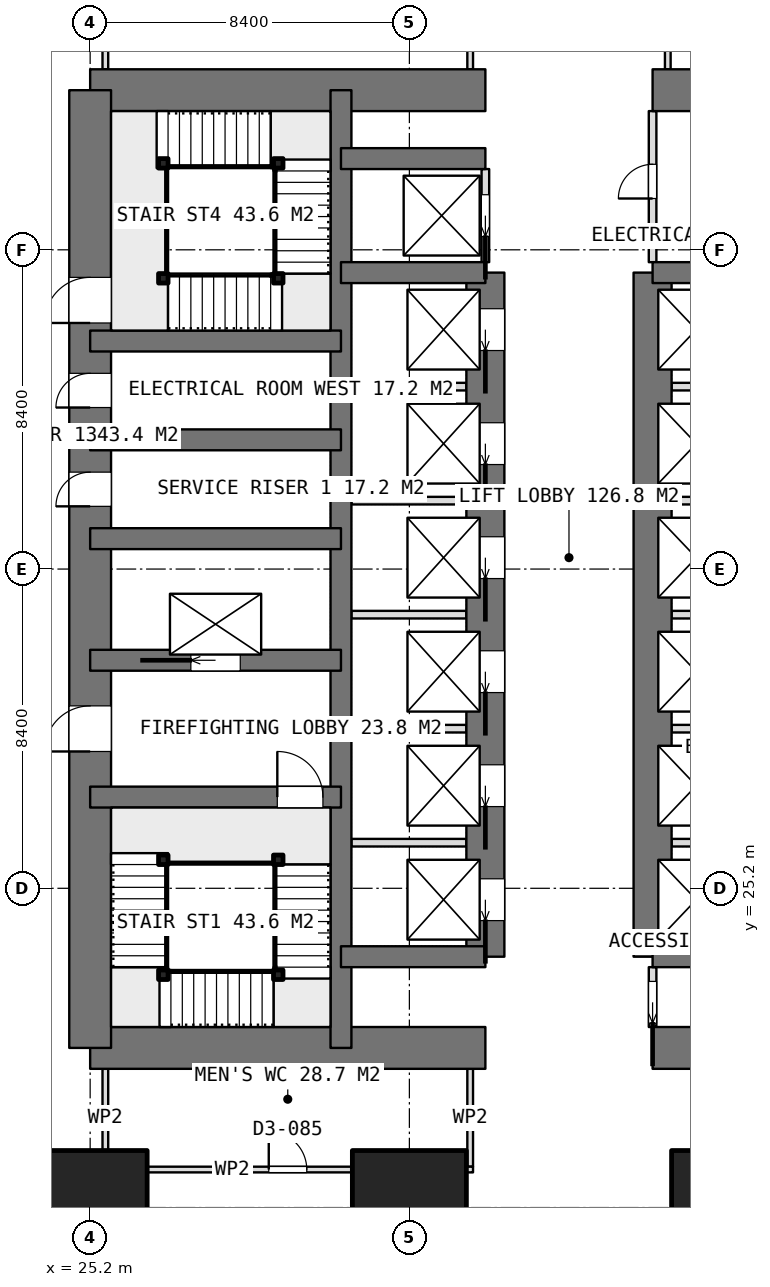
"""IFC4 building model, lengths in metres.
Left out: names, types, materials, properties, quantities, classifications, styles, units other than length and angle.
Written with IfcOpenShell. Run it as: python <this file> out.ifc"""

import sys

from ifc_helpers import new_model, si_unit, direction, frame, frame_2d, origin, origin_2d, place, context, subcontext, project, spatial, rectangle, extrude, element, fill, save


model = new_model("IFC4")
c1 = context("Model", 3, precision=1e-05, world=origin(), true_north=direction((0.0, 1.0)))
c2 = subcontext(c1, "Body", "Model", "MODEL_VIEW")
j1 = project(units=[si_unit("LENGTHUNIT", "METRE"), si_unit("PLANEANGLEUNIT", "RADIAN")], contexts=[c1])
p1 = place(None, origin())
s1 = spatial("IfcSite", under=j1, at=p1, CompositionType="ELEMENT")
p2 = place(p1, origin())
s2 = spatial("IfcBuilding", under=s1, at=p2, CompositionType="ELEMENT")
p3 = place(p2, frame((0.0, 0.0, 77.9)))
s3 = spatial("IfcBuildingStorey", under=s2, at=p3, CompositionType="ELEMENT", Elevation=77.9)
p4 = place(p3, frame((25.2, 21.0, 0.0), z_axis=(0.0, 0.0, 1.0), x_axis=(1.0, 0.0, 0.0)))
e1 = element("IfcWall", 1, at=p4, inside=s3, PredefinedType="SHEAR", context=c2, shape_type="SweptSolid", body=[
    extrude(rectangle(XDim=10.4, YDim=1.1, at=frame_2d((5.2, 0.0))), origin(), (0.0, 0.0, 1.0), 3.75),
])
p5 = place(p3, frame((40.0, 21.0, 0.0), z_axis=(0.0, 0.0, 1.0), x_axis=(1.0, 0.0, 0.0)))
e2 = element("IfcWall", 2, at=p5, inside=s3, PredefinedType="SHEAR", context=c2, shape_type="SweptSolid", body=[
    extrude(rectangle(XDim=10.4, YDim=1.1, at=frame_2d((5.2, 0.0))), origin(), (0.0, 0.0, 1.0), 3.75),
])
p6 = place(p3, frame((25.2, 46.2, 0.0), z_axis=(0.0, 0.0, 1.0), x_axis=(1.0, 0.0, 0.0)))
e3 = element("IfcWall", 3, at=p6, inside=s3, PredefinedType="SHEAR", context=c2, shape_type="SweptSolid", body=[
    extrude(rectangle(XDim=10.4, YDim=1.1, at=frame_2d((5.2, 0.0))), origin(), (0.0, 0.0, 1.0), 3.75),
])
p7 = place(p3, frame((40.0, 46.2, 0.0), z_axis=(0.0, 0.0, 1.0), x_axis=(1.0, 0.0, 0.0)))
e4 = element("IfcWall", 4, at=p7, inside=s3, PredefinedType="SHEAR", context=c2, shape_type="SweptSolid", body=[
    extrude(rectangle(XDim=10.4, YDim=1.1, at=frame_2d((5.2, 0.0))), origin(), (0.0, 0.0, 1.0), 3.75),
])
p8 = place(p3, frame((25.2, 21.0, 0.0), z_axis=(0.0, 0.0, 1.0), x_axis=(0.0, 1.0, 0.0)))
e5 = element("IfcWall", 5, at=p8, inside=s3, PredefinedType="SHEAR", context=c2, shape_type="SweptSolid", body=[
    extrude(rectangle(XDim=25.2, YDim=1.1, at=frame_2d((12.6, 0.0))), origin(), (0.0, 0.0, 1.0), 3.75),
])
p9 = place(p8, frame((7.8, 0.0, 0.0)))
e6 = element("IfcOpeningElement", 6, at=p9, cuts=e5, PredefinedType="OPENING", context=c2, shape_type="SweptSolid", body=[
    extrude(rectangle(XDim=1.2, YDim=2.1, at=frame_2d((0.6, 1.05))), frame((0.0, 0.56, 0.0), z_axis=(0.0, -1.0, 0.0), x_axis=(1.0, 0.0, 0.0)), (0.0, 0.0, 1.0), 1.12),
])
p10 = place(p8, frame((14.25, 0.0, 0.0)))
e7 = element("IfcOpeningElement", 7, at=p10, cuts=e5, PredefinedType="OPENING", context=c2, shape_type="SweptSolid", body=[
    extrude(rectangle(XDim=0.9, YDim=2.1, at=frame_2d((0.45, 1.05))), frame((0.0, 0.56, 0.0), z_axis=(0.0, -1.0, 0.0), x_axis=(1.0, 0.0, 0.0)), (0.0, 0.0, 1.0), 1.12),
])
p11 = place(p8, frame((16.85, 0.0, 0.0)))
e8 = element("IfcOpeningElement", 8, at=p11, cuts=e5, PredefinedType="OPENING", context=c2, shape_type="SweptSolid", body=[
    extrude(rectangle(XDim=0.9, YDim=2.1, at=frame_2d((0.45, 1.05))), frame((0.0, 0.56, 0.0), z_axis=(0.0, -1.0, 0.0), x_axis=(1.0, 0.0, 0.0)), (0.0, 0.0, 1.0), 1.12),
])
p12 = place(p8, frame((19.075, 0.0, 0.0)))
e9 = element("IfcOpeningElement", 9, at=p12, cuts=e5, PredefinedType="OPENING", context=c2, shape_type="SweptSolid", body=[
    extrude(rectangle(XDim=1.2, YDim=2.1, at=frame_2d((0.6, 1.05))), frame((0.0, 0.56, 0.0), z_axis=(0.0, -1.0, 0.0), x_axis=(1.0, 0.0, 0.0)), (0.0, 0.0, 1.0), 1.12),
])
p13 = place(p3, frame((31.8, 21.0, 0.0), z_axis=(0.0, 0.0, 1.0), x_axis=(0.0, 1.0, 0.0)))
e10 = element("IfcWall", 10, at=p13, inside=s3, PredefinedType="SHEAR", context=c2, shape_type="SweptSolid", body=[
    extrude(rectangle(XDim=25.2, YDim=0.55, at=frame_2d((12.6, 0.0))), origin(), (0.0, 0.0, 1.0), 3.75),
])
p14 = place(p3, frame((35.6, 23.4, 0.0), z_axis=(0.0, 0.0, 1.0), x_axis=(0.0, 1.0, 0.0)))
e11 = element("IfcWall", 11, at=p14, inside=s3, PredefinedType="SHEAR", context=c2, shape_type="SweptSolid", body=[
    extrude(rectangle(XDim=18.0, YDim=1.0, at=frame_2d((9.0, 0.0))), origin(), (0.0, 0.0, 1.0), 3.75),
])
p15 = place(p14, frame((0.95, 0.0, 0.0)))
e12 = element("IfcOpeningElement", 12, at=p15, cuts=e11, PredefinedType="OPENING", context=c2, shape_type="SweptSolid", body=[
    extrude(rectangle(XDim=1.1, YDim=2.1, at=frame_2d((0.55, 1.05))), frame((0.0, 0.51, 0.0), z_axis=(0.0, -1.0, 0.0), x_axis=(1.0, 0.0, 0.0)), (0.0, 0.0, 1.0), 1.02),
])
p16 = place(p14, frame((3.95, 0.0, 0.0)))
e13 = element("IfcOpeningElement", 13, at=p16, cuts=e11, PredefinedType="OPENING", context=c2, shape_type="SweptSolid", body=[
    extrude(rectangle(XDim=1.1, YDim=2.1, at=frame_2d((0.55, 1.05))), frame((0.0, 0.51, 0.0), z_axis=(0.0, -1.0, 0.0), x_axis=(1.0, 0.0, 0.0)), (0.0, 0.0, 1.0), 1.02),
])
p17 = place(p14, frame((6.95, 0.0, 0.0)))
e14 = element("IfcOpeningElement", 14, at=p17, cuts=e11, PredefinedType="OPENING", context=c2, shape_type="SweptSolid", body=[
    extrude(rectangle(XDim=1.1, YDim=2.1, at=frame_2d((0.55, 1.05))), frame((0.0, 0.51, 0.0), z_axis=(0.0, -1.0, 0.0), x_axis=(1.0, 0.0, 0.0)), (0.0, 0.0, 1.0), 1.02),
])
p18 = place(p14, frame((9.95, 0.0, 0.0)))
e15 = element("IfcOpeningElement", 15, at=p18, cuts=e11, PredefinedType="OPENING", context=c2, shape_type="SweptSolid", body=[
    extrude(rectangle(XDim=1.1, YDim=2.1, at=frame_2d((0.55, 1.05))), frame((0.0, 0.51, 0.0), z_axis=(0.0, -1.0, 0.0), x_axis=(1.0, 0.0, 0.0)), (0.0, 0.0, 1.0), 1.02),
])
p19 = place(p14, frame((12.95, 0.0, 0.0)))
e16 = element("IfcOpeningElement", 16, at=p19, cuts=e11, PredefinedType="OPENING", context=c2, shape_type="SweptSolid", body=[
    extrude(rectangle(XDim=1.1, YDim=2.1, at=frame_2d((0.55, 1.05))), frame((0.0, 0.51, 0.0), z_axis=(0.0, -1.0, 0.0), x_axis=(1.0, 0.0, 0.0)), (0.0, 0.0, 1.0), 1.02),
])
p20 = place(p14, frame((15.95, 0.0, 0.0)))
e17 = element("IfcOpeningElement", 17, at=p20, cuts=e11, PredefinedType="OPENING", context=c2, shape_type="SweptSolid", body=[
    extrude(rectangle(XDim=1.1, YDim=2.1, at=frame_2d((0.55, 1.05))), frame((0.0, 0.51, 0.0), z_axis=(0.0, -1.0, 0.0), x_axis=(1.0, 0.0, 0.0)), (0.0, 0.0, 1.0), 1.02),
])
p21 = place(p3, frame((40.0, 23.4, 0.0), z_axis=(0.0, 0.0, 1.0), x_axis=(0.0, 1.0, 0.0)))
e18 = element("IfcWall", 18, at=p21, inside=s3, PredefinedType="SHEAR", context=c2, shape_type="SweptSolid", body=[
    extrude(rectangle(XDim=18.0, YDim=1.0, at=frame_2d((9.0, 0.0))), origin(), (0.0, 0.0, 1.0), 3.75),
])
for number, where, z_axis, x_axis in (
    (19, (31.8, 23.4, 0.0), (0.0, 0.0, 1.0), (1.0, 0.0, 0.0)),
    (20, (31.8, 41.4, 0.0), (0.0, 0.0, 1.0), (1.0, 0.0, 0.0)),
    (21, (31.8, 44.4, 0.0), (0.0, 0.0, 1.0), (1.0, 0.0, 0.0)),
    (22, (40.0, 23.4, 0.0), (0.0, 0.0, 1.0), (1.0, 0.0, 0.0)),
    (23, (40.0, 41.4, 0.0), (0.0, 0.0, 1.0), (1.0, 0.0, 0.0)),
):
    element("IfcWall", number, at=place(p3, frame(where, z_axis=z_axis, x_axis=x_axis)), inside=s3, PredefinedType="SHEAR", context=c2, shape_type="SweptSolid", body=[
        extrude(rectangle(XDim=3.8, YDim=0.55, at=frame_2d((1.9, 0.0))), origin(), (0.0, 0.0, 1.0), 3.75),
    ])
p22 = place(p3, frame((25.2, 27.6, 0.0), z_axis=(0.0, 0.0, 1.0), x_axis=(1.0, 0.0, 0.0)))
e24 = element("IfcWall", 24, at=p22, inside=s3, PredefinedType="SHEAR", context=c2, shape_type="SweptSolid", body=[
    extrude(rectangle(XDim=6.6, YDim=0.55, at=frame_2d((3.3, 0.0))), origin(), (0.0, 0.0, 1.0), 3.75),
])
p23 = place(p22, frame((4.925, 0.0, 0.0)))
e25 = element("IfcOpeningElement", 25, at=p23, cuts=e24, PredefinedType="OPENING", context=c2, shape_type="SweptSolid", body=[
    extrude(rectangle(XDim=1.2, YDim=2.1, at=frame_2d((0.6, 1.05))), frame((0.0, 0.285, 0.0), z_axis=(0.0, -1.0, 0.0), x_axis=(1.0, 0.0, 0.0)), (0.0, 0.0, 1.0), 0.57),
])
p24 = place(p3, frame((25.2, 31.2, 0.0), z_axis=(0.0, 0.0, 1.0), x_axis=(1.0, 0.0, 0.0)))
e26 = element("IfcWall", 26, at=p24, inside=s3, PredefinedType="SHEAR", context=c2, shape_type="SweptSolid", body=[
    extrude(rectangle(XDim=6.6, YDim=0.55, at=frame_2d((3.3, 0.0))), origin(), (0.0, 0.0, 1.0), 3.75),
])
p25 = place(p24, frame((2.65, 0.0, 0.0)))
e27 = element("IfcOpeningElement", 27, at=p25, cuts=e26, PredefinedType="OPENING", context=c2, shape_type="SweptSolid", body=[
    extrude(rectangle(XDim=1.3, YDim=2.1, at=frame_2d((0.65, 1.05))), frame((0.0, 0.285, 0.0), z_axis=(0.0, -1.0, 0.0), x_axis=(1.0, 0.0, 0.0)), (0.0, 0.0, 1.0), 0.57),
])
for number, where, z_axis, x_axis in (
    (28, (25.2, 34.4, 0.0), (0.0, 0.0, 1.0), (1.0, 0.0, 0.0)),
    (29, (25.2, 37.0, 0.0), (0.0, 0.0, 1.0), (1.0, 0.0, 0.0)),
    (30, (25.2, 39.6, 0.0), (0.0, 0.0, 1.0), (1.0, 0.0, 0.0)),
):
    element("IfcWall", number, at=place(p3, frame(where, z_axis=z_axis, x_axis=x_axis)), inside=s3, PredefinedType="SHEAR", context=c2, shape_type="SweptSolid", body=[
        extrude(rectangle(XDim=6.6, YDim=0.55, at=frame_2d((3.3, 0.0))), origin(), (0.0, 0.0, 1.0), 3.75),
    ])
for number, where, z_axis, x_axis in (
    (31, (25.2, 16.8, 0.0), (0.0, 0.0, 1.0), (1.0, 0.0, 0.0)),
    (32, (33.6, 16.8, 0.0), (0.0, 0.0, 1.0), (1.0, 0.0, 0.0)),
    (33, (42.0, 16.8, 0.0), (0.0, 0.0, 1.0), (1.0, 0.0, 0.0)),
):
    element("IfcColumn", number, at=place(p3, frame(where, z_axis=z_axis, x_axis=x_axis)), inside=s3, PredefinedType="COLUMN", context=c2, shape_type="SweptSolid", body=[
        extrude(rectangle(XDim=3.0, YDim=3.0, at=origin_2d()), origin(), (0.0, 0.0, 1.0), 3.75),
    ])
for number, where, z_axis, x_axis in (
    (34, (32.075, 26.4, 0.0), (0.0, 0.0, 1.0), (1.0, 0.0, 0.0)),
    (35, (32.075, 29.4, 0.0), (0.0, 0.0, 1.0), (1.0, 0.0, 0.0)),
    (36, (32.075, 32.4, 0.0), (0.0, 0.0, 1.0), (1.0, 0.0, 0.0)),
    (37, (32.075, 35.4, 0.0), (0.0, 0.0, 1.0), (1.0, 0.0, 0.0)),
    (38, (32.075, 38.4, 0.0), (0.0, 0.0, 1.0), (1.0, 0.0, 0.0)),
):
    element("IfcWall", number, at=place(p3, frame(where, z_axis=z_axis, x_axis=x_axis)), inside=s3, PredefinedType="PARTITIONING", context=c2, shape_type="SweptSolid", body=[
        extrude(rectangle(XDim=3.025, YDim=0.2, at=frame_2d((1.513, 0.0))), origin(), (0.0, 0.0, 1.0), 3.5),
    ])
for number, where, z_axis, x_axis in (
    (39, (40.5, 26.4, 0.0), (0.0, 0.0, 1.0), (1.0, 0.0, 0.0)),
    (40, (40.5, 29.4, 0.0), (0.0, 0.0, 1.0), (1.0, 0.0, 0.0)),
    (41, (40.5, 32.4, 0.0), (0.0, 0.0, 1.0), (1.0, 0.0, 0.0)),
    (42, (40.5, 35.4, 0.0), (0.0, 0.0, 1.0), (1.0, 0.0, 0.0)),
    (43, (40.5, 38.4, 0.0), (0.0, 0.0, 1.0), (1.0, 0.0, 0.0)),
):
    element("IfcWall", number, at=place(p3, frame(where, z_axis=z_axis, x_axis=x_axis)), inside=s3, PredefinedType="PARTITIONING", context=c2, shape_type="SweptSolid", body=[
        extrude(rectangle(XDim=3.025, YDim=0.2, at=frame_2d((1.512, 0.0))), origin(), (0.0, 0.0, 1.0), 3.5),
    ])
p26 = place(p3, frame((40.0, 21.55, 0.0), z_axis=(0.0, 0.0, 1.0), x_axis=(0.0, 1.0, 0.0)))
e44 = element("IfcWall", 44, at=p26, inside=s3, PredefinedType="PARTITIONING", context=c2, shape_type="SweptSolid", body=[
    extrude(rectangle(XDim=1.575, YDim=0.2, at=frame_2d((0.788, 0.0))), origin(), (0.0, 0.0, 1.0), 3.5),
])
p27 = place(p26, frame((0.1, 0.0, 0.0)))
e45 = element("IfcOpeningElement", 45, at=p27, cuts=e44, PredefinedType="OPENING", context=c2, shape_type="SweptSolid", body=[
    extrude(rectangle(XDim=1.1, YDim=2.1, at=frame_2d((0.55, 1.05))), frame((0.0, 0.11, 0.0), z_axis=(0.0, -1.0, 0.0), x_axis=(1.0, 0.0, 0.0)), (0.0, 0.0, 1.0), 0.22),
])
p28 = place(p3, frame((40.0, 41.675, 0.0), z_axis=(0.0, 0.0, 1.0), x_axis=(0.0, 1.0, 0.0)))
e46 = element("IfcWall", 46, at=p28, inside=s3, PredefinedType="PARTITIONING", context=c2, shape_type="SweptSolid", body=[
    extrude(rectangle(XDim=3.975, YDim=0.2, at=frame_2d((1.987, 0.0))), origin(), (0.0, 0.0, 1.0), 3.5),
])
p29 = place(p28, frame((1.675, 0.0, 0.0)))
e47 = element("IfcOpeningElement", 47, at=p29, cuts=e46, PredefinedType="OPENING", context=c2, shape_type="SweptSolid", body=[
    extrude(rectangle(XDim=0.9, YDim=2.1, at=frame_2d((0.45, 1.05))), frame((0.0, 0.11, 0.0), z_axis=(0.0, -1.0, 0.0), x_axis=(1.0, 0.0, 0.0)), (0.0, 0.0, 1.0), 0.22),
])
p30 = place(p3, frame((35.6, 41.675, 0.0), z_axis=(0.0, 0.0, 1.0), x_axis=(0.0, 1.0, 0.0)))
e48 = element("IfcWall", 48, at=p30, inside=s3, PredefinedType="PARTITIONING", context=c2, shape_type="SweptSolid", body=[
    extrude(rectangle(XDim=2.45, YDim=0.2, at=frame_2d((1.225, 0.0))), origin(), (0.0, 0.0, 1.0), 3.5),
])
p31 = place(p30, frame((0.675, 0.0, 0.0)))
e49 = element("IfcOpeningElement", 49, at=p31, cuts=e48, PredefinedType="OPENING", context=c2, shape_type="SweptSolid", body=[
    extrude(rectangle(XDim=1.1, YDim=2.1, at=frame_2d((0.55, 1.05))), frame((0.0, 0.11, 0.0), z_axis=(0.0, -1.0, 0.0), x_axis=(1.0, 0.0, 0.0)), (0.0, 0.0, 1.0), 0.22),
])
for number, where, z_axis, x_axis in (
    (50, (40.4, 46.75, 0.0), (0.0, 0.0, 1.0), (0.0, 1.0, 0.0)),
    (51, (25.6, 46.75, 0.0), (0.0, 0.0, 1.0), (0.0, 1.0, 0.0)),
    (52, (35.2, 46.75, 0.0), (0.0, 0.0, 1.0), (0.0, 1.0, 0.0)),
):
    element("IfcWall", number, at=place(p3, frame(where, z_axis=z_axis, x_axis=x_axis)), inside=s3, PredefinedType="PARTITIONING", context=c2, shape_type="SweptSolid", body=[
        extrude(rectangle(XDim=2.575, YDim=0.15, at=frame_2d((1.288, 0.0))), origin(), (0.0, 0.0, 1.0), 3.5),
    ])
p32 = place(p3, frame((25.525, 17.8, 0.0), z_axis=(0.0, 0.0, 1.0), x_axis=(1.0, 0.0, 0.0)))
e53 = element("IfcWall", 53, at=p32, inside=s3, PredefinedType="PARTITIONING", context=c2, shape_type="SweptSolid", body=[
    extrude(rectangle(XDim=9.75, YDim=0.15, at=frame_2d((4.875, 0.0))), origin(), (0.0, 0.0, 1.0), 3.5),
])
p33 = place(p32, frame((4.375, 0.0, 0.0)))
e54 = element("IfcOpeningElement", 54, at=p33, cuts=e53, PredefinedType="OPENING", context=c2, shape_type="SweptSolid", body=[
    extrude(rectangle(XDim=1.0, YDim=2.1, at=frame_2d((0.5, 1.05))), frame((0.0, 0.085, 0.0), z_axis=(0.0, -1.0, 0.0), x_axis=(1.0, 0.0, 0.0)), (0.0, 0.0, 1.0), 0.17),
])
for number, where, z_axis, x_axis in (
    (55, (25.6, 17.875, 0.0), (0.0, 0.0, 1.0), (0.0, 1.0, 0.0)),
    (56, (35.2, 17.875, 0.0), (0.0, 0.0, 1.0), (0.0, 1.0, 0.0)),
):
    element("IfcWall", number, at=place(p3, frame(where, z_axis=z_axis, x_axis=x_axis)), inside=s3, PredefinedType="PARTITIONING", context=c2, shape_type="SweptSolid", body=[
        extrude(rectangle(XDim=2.575, YDim=0.15, at=frame_2d((1.288, 0.0))), origin(), (0.0, 0.0, 1.0), 3.5),
    ])
for number, where, z_axis, x_axis in (
    (57, (30.15, 25.95, 0.0), (0.0, 0.0, 1.0), (1.0, 0.0, 0.0)),
    (58, (30.15, 22.925, 0.0), (0.0, 0.0, 1.0), (1.0, 0.0, 0.0)),
    (59, (27.125, 22.925, 0.0), (0.0, 0.0, 1.0), (1.0, 0.0, 0.0)),
    (60, (27.125, 25.95, 0.0), (0.0, 0.0, 1.0), (1.0, 0.0, 0.0)),
    (61, (27.125, 41.25, 0.0), (0.0, 0.0, 1.0), (1.0, 0.0, 0.0)),
    (62, (30.15, 41.25, 0.0), (0.0, 0.0, 1.0), (1.0, 0.0, 0.0)),
    (63, (30.15, 44.275, 0.0), (0.0, 0.0, 1.0), (1.0, 0.0, 0.0)),
    (64, (27.125, 44.275, 0.0), (0.0, 0.0, 1.0), (1.0, 0.0, 0.0)),
):
    element("IfcColumn", number, at=place(p3, frame(where, z_axis=z_axis, x_axis=x_axis)), inside=s3, PredefinedType="COLUMN", context=c2, shape_type="SweptSolid", body=[
        extrude(rectangle(XDim=0.25, YDim=0.25, at=origin_2d()), origin(), (0.0, 0.0, 1.0), 3.75),
    ])
p34 = place(p9, origin())
e65 = element("IfcDoor", 65, at=p34, inside=s3, OperationType="SINGLE_SWING_LEFT", PredefinedType="DOOR", context=c2, shape_type="SweptSolid", body=[
    extrude(rectangle(XDim=1.2, YDim=2.1, at=frame_2d((0.6, 1.05))), frame((0.0, 0.025, 0.0), z_axis=(0.0, -1.0, 0.0), x_axis=(1.0, 0.0, 0.0)), (0.0, 0.0, 1.0), 0.05),
])
fill(e6, e65)
p35 = place(p10, origin())
e66 = element("IfcDoor", 66, at=p35, inside=s3, OperationType="SINGLE_SWING_LEFT", PredefinedType="DOOR", context=c2, shape_type="SweptSolid", body=[
    extrude(rectangle(XDim=0.9, YDim=2.1, at=frame_2d((0.45, 1.05))), frame((0.0, 0.025, 0.0), z_axis=(0.0, -1.0, 0.0), x_axis=(1.0, 0.0, 0.0)), (0.0, 0.0, 1.0), 0.05),
])
fill(e7, e66)
p36 = place(p11, origin())
e67 = element("IfcDoor", 67, at=p36, inside=s3, OperationType="SINGLE_SWING_LEFT", PredefinedType="DOOR", context=c2, shape_type="SweptSolid", body=[
    extrude(rectangle(XDim=0.9, YDim=2.1, at=frame_2d((0.45, 1.05))), frame((0.0, 0.025, 0.0), z_axis=(0.0, -1.0, 0.0), x_axis=(1.0, 0.0, 0.0)), (0.0, 0.0, 1.0), 0.05),
])
fill(e8, e67)
p37 = place(p27, origin())
e68 = element("IfcDoor", 68, at=p37, inside=s3, OperationType="SLIDING_TO_LEFT", PredefinedType="DOOR", context=c2, shape_type="SweptSolid", body=[
    extrude(rectangle(XDim=1.1, YDim=2.1, at=frame_2d((0.55, 1.05))), frame((0.0, 0.025, 0.0), z_axis=(0.0, -1.0, 0.0), x_axis=(1.0, 0.0, 0.0)), (0.0, 0.0, 1.0), 0.05),
])
fill(e45, e68)
p38 = place(p29, origin())
e69 = element("IfcDoor", 69, at=p38, inside=s3, OperationType="SINGLE_SWING_LEFT", PredefinedType="DOOR", context=c2, shape_type="SweptSolid", body=[
    extrude(rectangle(XDim=0.9, YDim=2.1, at=frame_2d((0.45, 1.05))), frame((0.0, 0.025, 0.0), z_axis=(0.0, -1.0, 0.0), x_axis=(1.0, 0.0, 0.0)), (0.0, 0.0, 1.0), 0.05),
])
fill(e47, e69)
p39 = place(p15, origin())
e70 = element("IfcDoor", 70, at=p39, inside=s3, OperationType="SLIDING_TO_LEFT", PredefinedType="USERDEFINED", context=c2, shape_type="SweptSolid", body=[
    extrude(rectangle(XDim=1.1, YDim=2.1, at=frame_2d((0.55, 1.05))), frame((0.0, 0.025, 0.0), z_axis=(0.0, -1.0, 0.0), x_axis=(1.0, 0.0, 0.0)), (0.0, 0.0, 1.0), 0.05),
])
fill(e12, e70)
p40 = place(p16, origin())
e71 = element("IfcDoor", 71, at=p40, inside=s3, OperationType="SLIDING_TO_LEFT", PredefinedType="USERDEFINED", context=c2, shape_type="SweptSolid", body=[
    extrude(rectangle(XDim=1.1, YDim=2.1, at=frame_2d((0.55, 1.05))), frame((0.0, 0.025, 0.0), z_axis=(0.0, -1.0, 0.0), x_axis=(1.0, 0.0, 0.0)), (0.0, 0.0, 1.0), 0.05),
])
fill(e13, e71)
p41 = place(p17, origin())
e72 = element("IfcDoor", 72, at=p41, inside=s3, OperationType="SLIDING_TO_LEFT", PredefinedType="USERDEFINED", context=c2, shape_type="SweptSolid", body=[
    extrude(rectangle(XDim=1.1, YDim=2.1, at=frame_2d((0.55, 1.05))), frame((0.0, 0.025, 0.0), z_axis=(0.0, -1.0, 0.0), x_axis=(1.0, 0.0, 0.0)), (0.0, 0.0, 1.0), 0.05),
])
fill(e14, e72)
p42 = place(p18, origin())
e73 = element("IfcDoor", 73, at=p42, inside=s3, OperationType="SLIDING_TO_LEFT", PredefinedType="USERDEFINED", context=c2, shape_type="SweptSolid", body=[
    extrude(rectangle(XDim=1.1, YDim=2.1, at=frame_2d((0.55, 1.05))), frame((0.0, 0.025, 0.0), z_axis=(0.0, -1.0, 0.0), x_axis=(1.0, 0.0, 0.0)), (0.0, 0.0, 1.0), 0.05),
])
fill(e15, e73)
p43 = place(p19, origin())
e74 = element("IfcDoor", 74, at=p43, inside=s3, OperationType="SLIDING_TO_LEFT", PredefinedType="USERDEFINED", context=c2, shape_type="SweptSolid", body=[
    extrude(rectangle(XDim=1.1, YDim=2.1, at=frame_2d((0.55, 1.05))), frame((0.0, 0.025, 0.0), z_axis=(0.0, -1.0, 0.0), x_axis=(1.0, 0.0, 0.0)), (0.0, 0.0, 1.0), 0.05),
])
fill(e16, e74)
p44 = place(p20, origin())
e75 = element("IfcDoor", 75, at=p44, inside=s3, OperationType="SLIDING_TO_LEFT", PredefinedType="USERDEFINED", context=c2, shape_type="SweptSolid", body=[
    extrude(rectangle(XDim=1.1, YDim=2.1, at=frame_2d((0.55, 1.05))), frame((0.0, 0.025, 0.0), z_axis=(0.0, -1.0, 0.0), x_axis=(1.0, 0.0, 0.0)), (0.0, 0.0, 1.0), 0.05),
])
fill(e17, e75)
p45 = place(p25, origin())
e76 = element("IfcDoor", 76, at=p45, inside=s3, OperationType="SLIDING_TO_LEFT", PredefinedType="USERDEFINED", context=c2, shape_type="SweptSolid", body=[
    extrude(rectangle(XDim=1.3, YDim=2.1, at=frame_2d((0.65, 1.05))), frame((0.0, 0.025, 0.0), z_axis=(0.0, -1.0, 0.0), x_axis=(1.0, 0.0, 0.0)), (0.0, 0.0, 1.0), 0.05),
])
fill(e27, e76)
p46 = place(p31, origin())
e77 = element("IfcDoor", 77, at=p46, inside=s3, OperationType="SLIDING_TO_LEFT", PredefinedType="USERDEFINED", context=c2, shape_type="SweptSolid", body=[
    extrude(rectangle(XDim=1.1, YDim=2.1, at=frame_2d((0.55, 1.05))), frame((0.0, 0.025, 0.0), z_axis=(0.0, -1.0, 0.0), x_axis=(1.0, 0.0, 0.0)), (0.0, 0.0, 1.0), 0.05),
])
fill(e49, e77)
p47 = place(p33, origin())
e78 = element("IfcDoor", 78, at=p47, inside=s3, OperationType="SINGLE_SWING_LEFT", PredefinedType="DOOR", context=c2, shape_type="SweptSolid", body=[
    extrude(rectangle(XDim=1.0, YDim=2.1, at=frame_2d((0.5, 1.05))), frame((0.0, 0.025, 0.0), z_axis=(0.0, -1.0, 0.0), x_axis=(1.0, 0.0, 0.0)), (0.0, 0.0, 1.0), 0.05),
])
fill(e54, e78)
p48 = place(p23, origin())
e79 = element("IfcDoor", 79, at=p48, inside=s3, OperationType="SINGLE_SWING_RIGHT", PredefinedType="DOOR", context=c2, shape_type="SweptSolid", body=[
    extrude(rectangle(XDim=1.2, YDim=2.1, at=frame_2d((0.6, 1.05))), frame((0.0, 0.025, 0.0), z_axis=(0.0, -1.0, 0.0), x_axis=(1.0, 0.0, 0.0)), (0.0, 0.0, 1.0), 0.05),
])
fill(e25, e79)
p49 = place(p12, origin())
e80 = element("IfcDoor", 80, at=p49, inside=s3, OperationType="SINGLE_SWING_RIGHT", PredefinedType="DOOR", context=c2, shape_type="SweptSolid", body=[
    extrude(rectangle(XDim=1.2, YDim=2.1, at=frame_2d((0.6, 1.05))), frame((0.0, 0.025, 0.0), z_axis=(0.0, -1.0, 0.0), x_axis=(1.0, 0.0, 0.0)), (0.0, 0.0, 1.0), 0.05),
])
fill(e9, e80)
save(model, sys.argv[1])
